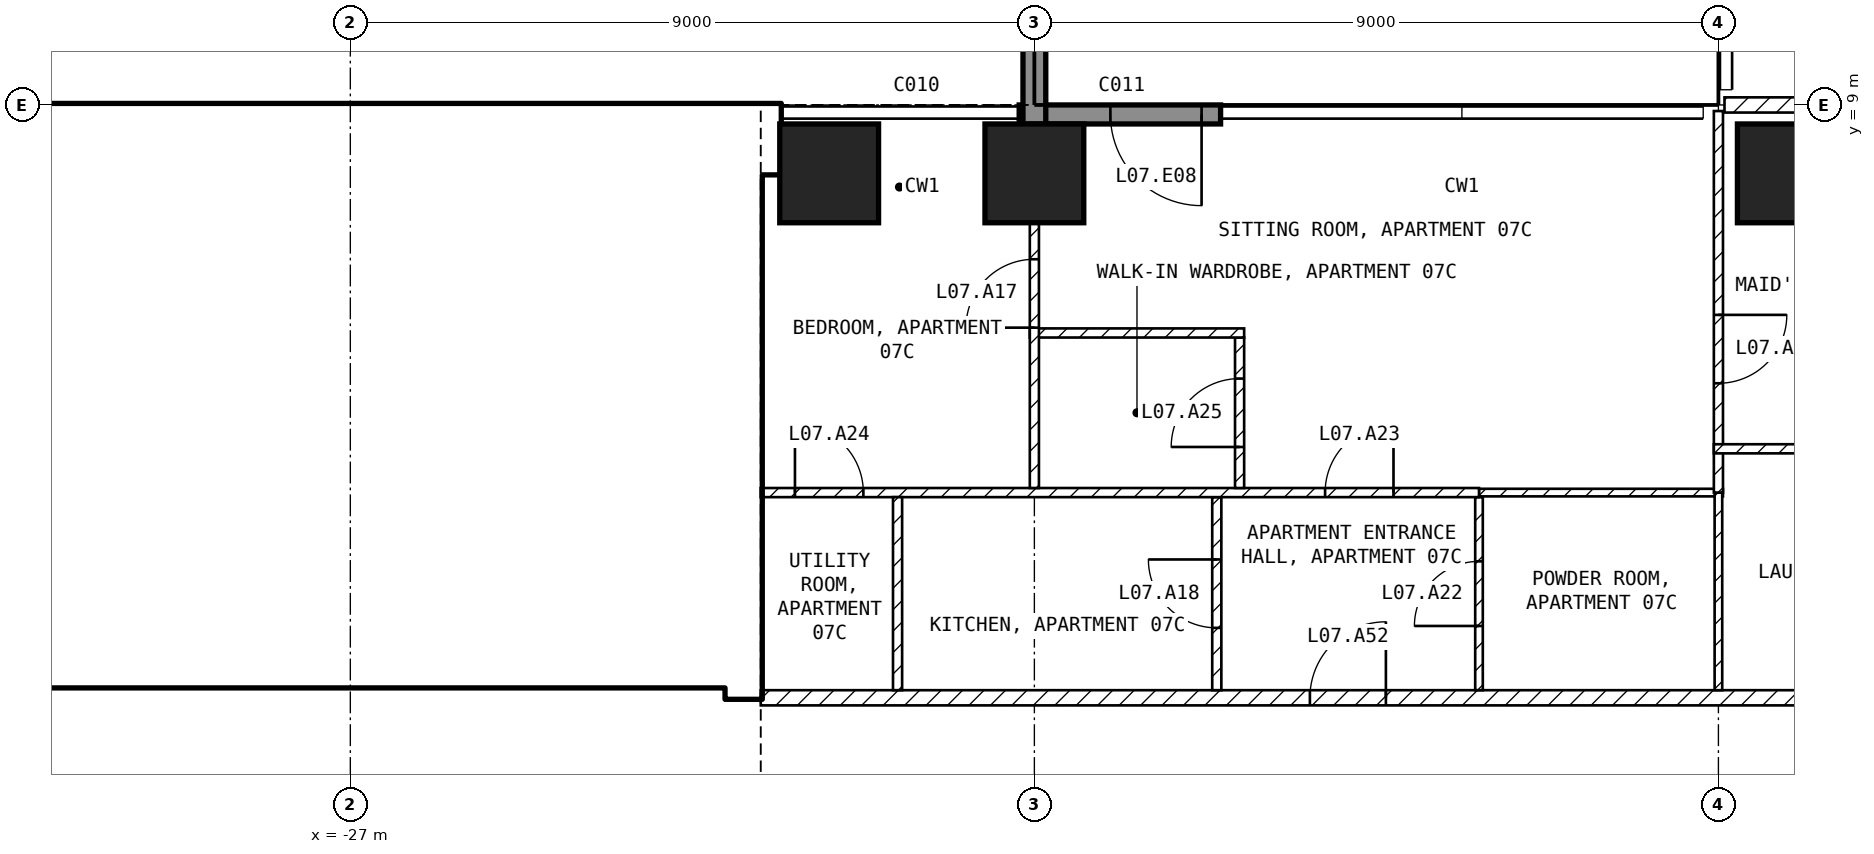
"""IFC4 building model, lengths in metres.
Left out: names, types, materials, properties, quantities, classifications, styles, units other than length and angle.
Written with IfcOpenShell. Run it as: python <this file> out.ifc"""

import sys

from ifc_helpers import new_model, si_unit, direction, frame, frame_2d, origin, origin_2d, place, context, subcontext, project, spatial, rectangle, extrude, element, fill, save


model = new_model("IFC4")
c1 = context("Model", 3, precision=1e-05, world=origin(), true_north=direction((0.0, 1.0)))
c2 = subcontext(c1, "Body", "Model", "MODEL_VIEW")
j1 = project(units=[si_unit("LENGTHUNIT", "METRE"), si_unit("PLANEANGLEUNIT", "RADIAN")], contexts=[c1])
p1 = place(None, origin())
s1 = spatial("IfcSite", under=j1, at=p1, CompositionType="ELEMENT")
p2 = place(p1, origin())
s2 = spatial("IfcBuilding", under=s1, at=p2, CompositionType="ELEMENT")
p3 = place(p2, frame((0.0, 0.0, 43.5)))
s3 = spatial("IfcBuildingStorey", under=s2, at=p3, CompositionType="ELEMENT", Elevation=43.5)
for number, where, z_axis, x_axis in (
    (1, (-20.7, 8.1, -0.25), (0.0, 0.0, 1.0), (1.0, 0.0, 0.0)),
    (2, (-18.0, 8.1, -0.25), (0.0, 0.0, 1.0), (1.0, 0.0, 0.0)),
    (3, (-8.1, 8.1, -0.25), (0.0, 0.0, 1.0), (1.0, 0.0, 0.0)),
):
    element("IfcColumn", number, at=place(p3, frame(where, z_axis=z_axis, x_axis=x_axis)), inside=s3, PredefinedType="COLUMN", context=c2, shape_type="SweptSolid", body=[
        extrude(rectangle(XDim=1.3, YDim=1.3, at=origin_2d()), origin(), (0.0, 0.0, 1.0), 3.5),
    ])
p4 = place(p3, frame((-15.55, 8.875, 0.0), z_axis=(0.0, 0.0, 1.0), x_axis=(-1.0, 0.0, 0.0)))
e4 = element("IfcWall", 4, at=p4, inside=s3, PredefinedType="SOLIDWALL", context=c2, shape_type="SweptSolid", body=[
    extrude(rectangle(XDim=2.65, YDim=0.25, at=frame_2d((1.325, 0.0))), origin(), (0.0, 0.0, 1.0), 3.25),
])
p5 = place(p4, frame((0.25, 0.0, 0.0)))
e5 = element("IfcOpeningElement", 5, at=p5, cuts=e4, PredefinedType="OPENING", context=c2, shape_type="SweptSolid", body=[
    extrude(rectangle(XDim=1.2, YDim=2.4, at=frame_2d((0.6, 1.2))), frame((0.0, 0.135, 0.0), z_axis=(0.0, -1.0, 0.0), x_axis=(1.0, 0.0, 0.0)), (0.0, 0.0, 1.0), 0.27),
])
p6 = place(p3, frame((-18.0, 8.75, 0.0), z_axis=(0.0, 0.0, 1.0), x_axis=(0.0, 1.0, 0.0)))
e6 = element("IfcWall", 6, at=p6, inside=s3, PredefinedType="SOLIDWALL", context=c2, shape_type="SweptSolid", body=[
    extrude(rectangle(XDim=2.95, YDim=0.3, at=frame_2d((1.475, 0.0))), origin(), (0.0, 0.0, 1.0), 3.25),
])
p7 = place(p3, frame((-31.5, 8.55, 0.0), z_axis=(0.0, 0.0, 1.0), x_axis=(1.0, 0.0, 0.0)))
e7 = element("IfcWall", 7, at=p7, inside=s3, PredefinedType="SHEAR", context=c2, shape_type="SweptSolid", body=[
    extrude(rectangle(XDim=10.15, YDim=0.9, at=frame_2d((5.075, 0.0))), origin(), (0.0, 0.0, 1.0), 3.25),
])
p8 = place(p3, frame((-21.825, 1.2, 0.0), z_axis=(0.0, 0.0, 1.0), x_axis=(0.0, 1.0, 0.0)))
e8 = element("IfcWall", 8, at=p8, inside=s3, PredefinedType="SHEAR", context=c2, shape_type="SweptSolid", body=[
    extrude(rectangle(XDim=6.9, YDim=0.45, at=frame_2d((3.45, 0.0))), origin(), (0.0, 0.0, 1.0), 3.25),
])
p9 = place(p3, frame((-35.1, 1.45, 0.0), z_axis=(0.0, 0.0, 1.0), x_axis=(1.0, 0.0, 0.0)))
e9 = element("IfcWall", 9, at=p9, inside=s3, PredefinedType="SOLIDWALL", context=c2, shape_type="SweptSolid", body=[
    extrude(rectangle(XDim=13.05, YDim=0.2, at=frame_2d((6.525, 0.0))), origin(), (0.0, 0.0, 1.0), 3.25),
])
p10 = place(p9, frame((11.3, 0.0, 0.0)))
e10 = element("IfcOpeningElement", 10, at=p10, cuts=e9, PredefinedType="OPENING", context=c2, shape_type="SweptSolid", body=[
    extrude(rectangle(XDim=1.0, YDim=2.1, at=frame_2d((0.5, 1.05))), frame((0.0, 0.11, 0.0), z_axis=(0.0, -1.0, 0.0), x_axis=(1.0, 0.0, 0.0)), (0.0, 0.0, 1.0), 0.22),
])
p11 = place(p9, frame((8.8, 0.0, 0.0)))
e11 = element("IfcOpeningElement", 11, at=p11, cuts=e9, PredefinedType="OPENING", context=c2, shape_type="SweptSolid", body=[
    extrude(rectangle(XDim=1.0, YDim=2.1, at=frame_2d((0.5, 1.05))), frame((0.0, 0.11, 0.0), z_axis=(0.0, -1.0, 0.0), x_axis=(1.0, 0.0, 0.0)), (0.0, 0.0, 1.0), 0.22),
])
p12 = place(p3, frame((-28.35, 5.15, 0.0), z_axis=(0.0, 0.0, 1.0), x_axis=(1.0, 0.0, 0.0)))
e12 = element("IfcWall", 12, at=p12, inside=s3, PredefinedType="SOLIDWALL", context=c2, shape_type="SweptSolid", body=[
    extrude(rectangle(XDim=6.3, YDim=0.2, at=frame_2d((3.15, 0.0))), origin(), (0.0, 0.0, 1.0), 3.25),
])
p13 = place(p12, frame((5.1, 0.0, 0.0)))
e13 = element("IfcOpeningElement", 13, at=p13, cuts=e12, PredefinedType="OPENING", context=c2, shape_type="SweptSolid", body=[
    extrude(rectangle(XDim=1.0, YDim=2.1, at=frame_2d((0.5, 1.05))), frame((0.0, 0.11, 0.0), z_axis=(0.0, -1.0, 0.0), x_axis=(1.0, 0.0, 0.0)), (0.0, 0.0, 1.0), 0.22),
])
p14 = place(p3, frame((-28.25, 5.25, 0.0), z_axis=(0.0, 0.0, 1.0), x_axis=(0.0, 1.0, 0.0)))
e14 = element("IfcWall", 14, at=p14, inside=s3, PredefinedType="SOLIDWALL", context=c2, shape_type="SweptSolid", body=[
    extrude(rectangle(XDim=2.85, YDim=0.2, at=frame_2d((1.425, 0.0))), origin(), (0.0, 0.0, 1.0), 3.25),
])
p15 = place(p3, frame((-35.1, 3.95, 0.0), z_axis=(0.0, 0.0, 1.0), x_axis=(1.0, 0.0, 0.0)))
e15 = element("IfcWall", 15, at=p15, inside=s3, PredefinedType="SOLIDWALL", context=c2, shape_type="SweptSolid", body=[
    extrude(rectangle(XDim=7.9, YDim=0.2, at=frame_2d((3.95, 0.0))), origin(), (0.0, 0.0, 1.0), 3.25),
])
p16 = place(p3, frame((-27.1, 1.55, 0.0), z_axis=(0.0, 0.0, 1.0), x_axis=(0.0, 1.0, 0.0)))
e16 = element("IfcWall", 16, at=p16, inside=s3, PredefinedType="SOLIDWALL", context=c2, shape_type="SweptSolid", body=[
    extrude(rectangle(XDim=3.5, YDim=0.2, at=frame_2d((1.75, 0.0))), origin(), (0.0, 0.0, 1.0), 3.25),
])
p17 = place(p16, frame((0.6, 0.0, 0.0)))
e17 = element("IfcOpeningElement", 17, at=p17, cuts=e16, PredefinedType="OPENING", context=c2, shape_type="SweptSolid", body=[
    extrude(rectangle(XDim=1.1, YDim=2.1, at=frame_2d((0.55, 1.05))), frame((0.0, 0.11, 0.0), z_axis=(0.0, -1.0, 0.0), x_axis=(1.0, 0.0, 0.0)), (0.0, 0.0, 1.0), 0.22),
])
p18 = place(p16, frame((2.6, 0.0, 0.0)))
e18 = element("IfcOpeningElement", 18, at=p18, cuts=e16, PredefinedType="OPENING", context=c2, shape_type="SweptSolid", body=[
    extrude(rectangle(XDim=0.8, YDim=2.1, at=frame_2d((0.4, 1.05))), frame((0.0, 0.11, 0.0), z_axis=(0.0, -1.0, 0.0), x_axis=(1.0, 0.0, 0.0)), (0.0, 0.0, 1.0), 0.22),
])
p19 = place(p3, frame((-30.0, 1.55, 0.0), z_axis=(0.0, 0.0, 1.0), x_axis=(0.0, 1.0, 0.0)))
e19 = element("IfcWall", 19, at=p19, inside=s3, PredefinedType="SOLIDWALL", context=c2, shape_type="SweptSolid", body=[
    extrude(rectangle(XDim=2.3, YDim=0.2, at=frame_2d((1.15, 0.0))), origin(), (0.0, 0.0, 1.0), 3.25),
])
p20 = place(p3, frame((-30.0, 4.05, 0.0), z_axis=(0.0, 0.0, 1.0), x_axis=(0.0, 1.0, 0.0)))
e20 = element("IfcWall", 20, at=p20, inside=s3, PredefinedType="PARTITIONING", context=c2, shape_type="SweptSolid", body=[
    extrude(rectangle(XDim=4.05, YDim=0.15, at=frame_2d((2.025, 0.0))), origin(), (0.0, 0.0, 1.0), 3.25),
])
p21 = place(p20, frame((0.1, 0.0, 0.0)))
e21 = element("IfcOpeningElement", 21, at=p21, cuts=e20, PredefinedType="OPENING", context=c2, shape_type="SweptSolid", body=[
    extrude(rectangle(XDim=0.8, YDim=2.1, at=frame_2d((0.4, 1.05))), frame((0.0, 0.085, 0.0), z_axis=(0.0, -1.0, 0.0), x_axis=(1.0, 0.0, 0.0)), (0.0, 0.0, 1.0), 0.17),
])
p22 = place(p3, frame((-21.6, 1.2, 0.0), z_axis=(0.0, 0.0, 1.0), x_axis=(1.0, 0.0, 0.0)))
e22 = element("IfcWall", 22, at=p22, inside=s3, PredefinedType="PARTITIONING", context=c2, shape_type="SweptSolid", body=[
    extrude(rectangle(XDim=20.5, YDim=0.2, at=frame_2d((10.25, 0.0))), origin(), (0.0, 0.0, 1.0), 3.25),
])
p23 = place(p22, frame((7.225, 0.0, 0.0)))
e23 = element("IfcOpeningElement", 23, at=p23, cuts=e22, PredefinedType="OPENING", context=c2, shape_type="SweptSolid", body=[
    extrude(rectangle(XDim=1.0, YDim=2.1, at=frame_2d((0.5, 1.05))), frame((0.0, 0.11, 0.0), z_axis=(0.0, -1.0, 0.0), x_axis=(1.0, 0.0, 0.0)), (0.0, 0.0, 1.0), 0.22),
])
p24 = place(p3, frame((-8.92, 9.0, 0.0), z_axis=(0.0, 0.0, 1.0), x_axis=(1.0, 0.0, 0.0)))
e24 = element("IfcWall", 24, at=p24, inside=s3, PredefinedType="PARTITIONING", context=c2, shape_type="SweptSolid", body=[
    extrude(rectangle(XDim=17.84, YDim=0.2, at=frame_2d((8.92, 0.0))), origin(), (0.0, 0.0, 1.0), 3.25),
])
p25 = place(p24, frame((8.42, 0.0, 0.0)))
e25 = element("IfcOpeningElement", 25, at=p25, cuts=e24, PredefinedType="OPENING", context=c2, shape_type="SweptSolid", body=[
    extrude(rectangle(XDim=1.0, YDim=2.1, at=frame_2d((0.5, 1.05))), frame((0.0, 0.11, 0.0), z_axis=(0.0, -1.0, 0.0), x_axis=(1.0, 0.0, 0.0)), (0.0, 0.0, 1.0), 0.22),
])
p26 = place(p3, frame((-12.15, 1.3, 0.0), z_axis=(0.0, 0.0, 1.0), x_axis=(0.0, 1.0, 0.0)))
e26 = element("IfcWall", 26, at=p26, inside=s3, PredefinedType="PARTITIONING", context=c2, shape_type="SweptSolid", body=[
    extrude(rectangle(XDim=2.54, YDim=0.1, at=frame_2d((1.27, 0.0))), origin(), (0.0, 0.0, 1.0), 3.25),
])
p27 = place(p26, frame((0.845, 0.0, 0.0)))
e27 = element("IfcOpeningElement", 27, at=p27, cuts=e26, PredefinedType="OPENING", context=c2, shape_type="SweptSolid", body=[
    extrude(rectangle(XDim=0.85, YDim=2.1, at=frame_2d((0.425, 1.05))), frame((0.0, 0.06, 0.0), z_axis=(0.0, -1.0, 0.0), x_axis=(1.0, 0.0, 0.0)), (0.0, 0.0, 1.0), 0.12),
])
p28 = place(p3, frame((-12.15, 3.9, 0.0), z_axis=(0.0, 0.0, 1.0), x_axis=(1.0, 0.0, 0.0)))
e28 = element("IfcWall", 28, at=p28, inside=s3, PredefinedType="PARTITIONING", context=c2, shape_type="SweptSolid", body=[
    extrude(rectangle(XDim=3.21, YDim=0.1, at=frame_2d((1.605, 0.0))), origin(), (0.0, 0.0, 1.0), 3.25),
])
p29 = place(p3, frame((-9.0, 3.9, 0.0), z_axis=(0.0, 0.0, 1.0), x_axis=(0.0, -1.0, 0.0)))
e29 = element("IfcWall", 29, at=p29, inside=s3, PredefinedType="PARTITIONING", context=c2, shape_type="SweptSolid", body=[
    extrude(rectangle(XDim=2.6, YDim=0.1, at=frame_2d((1.3, 0.0))), origin(), (0.0, 0.0, 1.0), 3.25),
])
p30 = place(p3, frame((-15.6, 1.3, 0.0), z_axis=(0.0, 0.0, 1.0), x_axis=(0.0, 1.0, 0.0)))
e30 = element("IfcWall", 30, at=p30, inside=s3, PredefinedType="PARTITIONING", context=c2, shape_type="SweptSolid", body=[
    extrude(rectangle(XDim=2.54, YDim=0.12, at=frame_2d((1.27, 0.0))), origin(), (0.0, 0.0, 1.0), 3.25),
])
p31 = place(p30, frame((0.82, 0.0, 0.0)))
e31 = element("IfcOpeningElement", 31, at=p31, cuts=e30, PredefinedType="OPENING", context=c2, shape_type="SweptSolid", body=[
    extrude(rectangle(XDim=0.9, YDim=2.1, at=frame_2d((0.45, 1.05))), frame((0.0, 0.07, 0.0), z_axis=(0.0, -1.0, 0.0), x_axis=(1.0, 0.0, 0.0)), (0.0, 0.0, 1.0), 0.14),
])
p32 = place(p3, frame((-21.6, 3.9, 0.0), z_axis=(0.0, 0.0, 1.0), x_axis=(1.0, 0.0, 0.0)))
e32 = element("IfcWall", 32, at=p32, inside=s3, PredefinedType="PARTITIONING", context=c2, shape_type="SweptSolid", body=[
    extrude(rectangle(XDim=9.45, YDim=0.12, at=frame_2d((4.725, 0.0))), origin(), (0.0, 0.0, 1.0), 3.25),
])
p33 = place(p32, frame((7.425, 0.0, 0.0)))
e33 = element("IfcOpeningElement", 33, at=p33, cuts=e32, PredefinedType="OPENING", context=c2, shape_type="SweptSolid", body=[
    extrude(rectangle(XDim=0.9, YDim=2.1, at=frame_2d((0.45, 1.05))), frame((0.0, 0.07, 0.0), z_axis=(0.0, -1.0, 0.0), x_axis=(1.0, 0.0, 0.0)), (0.0, 0.0, 1.0), 0.14),
])
p34 = place(p32, frame((0.45, 0.0, 0.0)))
e34 = element("IfcOpeningElement", 34, at=p34, cuts=e32, PredefinedType="OPENING", context=c2, shape_type="SweptSolid", body=[
    extrude(rectangle(XDim=0.9, YDim=2.1, at=frame_2d((0.45, 1.05))), frame((0.0, 0.07, 0.0), z_axis=(0.0, -1.0, 0.0), x_axis=(1.0, 0.0, 0.0)), (0.0, 0.0, 1.0), 0.14),
])
p35 = place(p3, frame((-19.8, 1.3, 0.0), z_axis=(0.0, 0.0, 1.0), x_axis=(0.0, 1.0, 0.0)))
e35 = element("IfcWall", 35, at=p35, inside=s3, PredefinedType="PARTITIONING", context=c2, shape_type="SweptSolid", body=[
    extrude(rectangle(XDim=2.54, YDim=0.12, at=frame_2d((1.27, 0.0))), origin(), (0.0, 0.0, 1.0), 3.25),
])
p36 = place(p3, frame((-15.3, 3.96, 0.0), z_axis=(0.0, 0.0, 1.0), x_axis=(0.0, 1.0, 0.0)))
e36 = element("IfcWall", 36, at=p36, inside=s3, PredefinedType="PARTITIONING", context=c2, shape_type="SweptSolid", body=[
    extrude(rectangle(XDim=1.98, YDim=0.12, at=frame_2d((0.99, 0.0))), origin(), (0.0, 0.0, 1.0), 3.25),
])
p37 = place(p36, frame((0.54, 0.0, 0.0)))
e37 = element("IfcOpeningElement", 37, at=p37, cuts=e36, PredefinedType="OPENING", context=c2, shape_type="SweptSolid", body=[
    extrude(rectangle(XDim=0.9, YDim=2.1, at=frame_2d((0.45, 1.05))), frame((0.0, 0.07, 0.0), z_axis=(0.0, -1.0, 0.0), x_axis=(1.0, 0.0, 0.0)), (0.0, 0.0, 1.0), 0.14),
])
p38 = place(p3, frame((-15.24, 6.0, 0.0), z_axis=(0.0, 0.0, 1.0), x_axis=(-1.0, 0.0, 0.0)))
e38 = element("IfcWall", 38, at=p38, inside=s3, PredefinedType="PARTITIONING", context=c2, shape_type="SweptSolid", body=[
    extrude(rectangle(XDim=2.82, YDim=0.12, at=frame_2d((1.41, 0.0))), origin(), (0.0, 0.0, 1.0), 3.25),
])
p39 = place(p3, frame((-18.0, 3.96, 0.0), z_axis=(0.0, 0.0, 1.0), x_axis=(0.0, 1.0, 0.0)))
e39 = element("IfcWall", 39, at=p39, inside=s3, PredefinedType="PARTITIONING", context=c2, shape_type="SweptSolid", body=[
    extrude(rectangle(XDim=3.49, YDim=0.12, at=frame_2d((1.745, 0.0))), origin(), (0.0, 0.0, 1.0), 2.346),
])
p40 = place(p39, frame((2.11, 0.0, 0.0)))
e40 = element("IfcOpeningElement", 40, at=p40, cuts=e39, PredefinedType="OPENING", context=c2, shape_type="SweptSolid", body=[
    extrude(rectangle(XDim=0.9, YDim=2.1, at=frame_2d((0.45, 1.05))), frame((0.0, 0.07, 0.0), z_axis=(0.0, -1.0, 0.0), x_axis=(1.0, 0.0, 0.0)), (0.0, 0.0, 1.0), 0.14),
])
p41 = place(p3, frame((-9.0, 8.92, 0.0), z_axis=(0.0, 0.0, 1.0), x_axis=(0.0, -1.0, 0.0)))
e41 = element("IfcWall", 41, at=p41, inside=s3, PredefinedType="PARTITIONING", context=c2, shape_type="SweptSolid", body=[
    extrude(rectangle(XDim=5.02, YDim=0.12, at=frame_2d((2.51, 0.0))), origin(), (0.0, 0.0, 1.0), 3.25),
])
p42 = place(p41, frame((2.682, 0.0, 0.0)))
e42 = element("IfcOpeningElement", 42, at=p42, cuts=e41, PredefinedType="OPENING", context=c2, shape_type="SweptSolid", body=[
    extrude(rectangle(XDim=0.9, YDim=2.1, at=frame_2d((0.45, 1.05))), frame((0.0, 0.07, 0.0), z_axis=(0.0, -1.0, 0.0), x_axis=(1.0, 0.0, 0.0)), (0.0, 0.0, 1.0), 0.14),
])
p43 = place(p3, frame((-9.06, 4.476, 0.0), z_axis=(0.0, 0.0, 1.0), x_axis=(1.0, 0.0, 0.0)))
e43 = element("IfcWall", 43, at=p43, inside=s3, PredefinedType="PARTITIONING", context=c2, shape_type="SweptSolid", body=[
    extrude(rectangle(XDim=4.62, YDim=0.12, at=frame_2d((2.31, 0.0))), origin(), (0.0, 0.0, 1.0), 3.25),
])
p44 = place(p43, frame((1.86, 0.0, 0.0)))
e44 = element("IfcOpeningElement", 44, at=p44, cuts=e43, PredefinedType="OPENING", context=c2, shape_type="SweptSolid", body=[
    extrude(rectangle(XDim=0.9, YDim=2.1, at=frame_2d((0.45, 1.05))), frame((0.0, 0.07, 0.0), z_axis=(0.0, -1.0, 0.0), x_axis=(1.0, 0.0, 0.0)), (0.0, 0.0, 1.0), 0.14),
])
p45 = place(p5, origin())
e45 = element("IfcDoor", 45, at=p45, inside=s3, OperationType="SINGLE_SWING_LEFT", PredefinedType="DOOR", context=c2, shape_type="SweptSolid", body=[
    extrude(rectangle(XDim=1.2, YDim=2.4, at=frame_2d((0.6, 1.2))), frame((0.0, 0.025, 0.0), z_axis=(0.0, -1.0, 0.0), x_axis=(1.0, 0.0, 0.0)), (0.0, 0.0, 1.0), 0.05),
])
fill(e5, e45)
p46 = place(p17, origin())
e46 = element("IfcDoor", 46, at=p46, inside=s3, OperationType="DOUBLE_DOOR_SLIDING", PredefinedType="DOOR", context=c2, shape_type="SweptSolid", body=[
    extrude(rectangle(XDim=1.1, YDim=2.1, at=frame_2d((0.55, 1.05))), frame((0.0, 0.025, 0.0), z_axis=(0.0, -1.0, 0.0), x_axis=(1.0, 0.0, 0.0)), (0.0, 0.0, 1.0), 0.05),
])
fill(e17, e46)
p47 = place(p13, origin())
e47 = element("IfcDoor", 47, at=p47, inside=s3, OperationType="SINGLE_SWING_LEFT", PredefinedType="DOOR", context=c2, shape_type="SweptSolid", body=[
    extrude(rectangle(XDim=1.0, YDim=2.1, at=frame_2d((0.5, 1.05))), frame((0.0, 0.025, 0.0), z_axis=(0.0, -1.0, 0.0), x_axis=(1.0, 0.0, 0.0)), (0.0, 0.0, 1.0), 0.05),
])
fill(e13, e47)
p48 = place(p10, origin())
e48 = element("IfcDoor", 48, at=p48, inside=s3, OperationType="SINGLE_SWING_LEFT", PredefinedType="DOOR", context=c2, shape_type="SweptSolid", body=[
    extrude(rectangle(XDim=1.0, YDim=2.1, at=frame_2d((0.5, 1.05))), frame((0.0, 0.025, 0.0), z_axis=(0.0, -1.0, 0.0), x_axis=(1.0, 0.0, 0.0)), (0.0, 0.0, 1.0), 0.05),
])
fill(e10, e48)
p49 = place(p11, origin())
e49 = element("IfcDoor", 49, at=p49, inside=s3, OperationType="SINGLE_SWING_LEFT", PredefinedType="DOOR", context=c2, shape_type="SweptSolid", body=[
    extrude(rectangle(XDim=1.0, YDim=2.1, at=frame_2d((0.5, 1.05))), frame((0.0, 0.025, 0.0), z_axis=(0.0, -1.0, 0.0), x_axis=(1.0, 0.0, 0.0)), (0.0, 0.0, 1.0), 0.05),
])
fill(e11, e49)
p50 = place(p18, origin())
e50 = element("IfcDoor", 50, at=p50, inside=s3, OperationType="SINGLE_SWING_LEFT", PredefinedType="DOOR", context=c2, shape_type="SweptSolid", body=[
    extrude(rectangle(XDim=0.8, YDim=2.1, at=frame_2d((0.4, 1.05))), frame((0.0, 0.025, 0.0), z_axis=(0.0, -1.0, 0.0), x_axis=(1.0, 0.0, 0.0)), (0.0, 0.0, 1.0), 0.05),
])
fill(e18, e50)
p51 = place(p21, origin())
e51 = element("IfcDoor", 51, at=p51, inside=s3, OperationType="SINGLE_SWING_LEFT", PredefinedType="DOOR", context=c2, shape_type="SweptSolid", body=[
    extrude(rectangle(XDim=0.8, YDim=2.1, at=frame_2d((0.4, 1.05))), frame((0.0, 0.025, 0.0), z_axis=(0.0, -1.0, 0.0), x_axis=(1.0, 0.0, 0.0)), (0.0, 0.0, 1.0), 0.05),
])
fill(e21, e51)
p52 = place(p40, origin())
e52 = element("IfcDoor", 52, at=p52, inside=s3, OperationType="SINGLE_SWING_LEFT", PredefinedType="DOOR", context=c2, shape_type="SweptSolid", body=[
    extrude(rectangle(XDim=0.9, YDim=2.1, at=frame_2d((0.45, 1.05))), frame((0.0, 0.025, 0.0), z_axis=(0.0, -1.0, 0.0), x_axis=(1.0, 0.0, 0.0)), (0.0, 0.0, 1.0), 0.05),
])
fill(e40, e52)
p53 = place(p31, origin())
e53 = element("IfcDoor", 53, at=p53, inside=s3, OperationType="SINGLE_SWING_RIGHT", PredefinedType="DOOR", context=c2, shape_type="SweptSolid", body=[
    extrude(rectangle(XDim=0.9, YDim=2.1, at=frame_2d((0.45, 1.05))), frame((0.0, 0.025, 0.0), z_axis=(0.0, -1.0, 0.0), x_axis=(1.0, 0.0, 0.0)), (0.0, 0.0, 1.0), 0.05),
])
fill(e31, e53)
p54 = place(p42, origin())
e54 = element("IfcDoor", 54, at=p54, inside=s3, OperationType="SINGLE_SWING_LEFT", PredefinedType="DOOR", context=c2, shape_type="SweptSolid", body=[
    extrude(rectangle(XDim=0.9, YDim=2.1, at=frame_2d((0.45, 1.05))), frame((0.0, 0.025, 0.0), z_axis=(0.0, -1.0, 0.0), x_axis=(1.0, 0.0, 0.0)), (0.0, 0.0, 1.0), 0.05),
])
fill(e42, e54)
p55 = place(p27, origin())
e55 = element("IfcDoor", 55, at=p55, inside=s3, OperationType="SINGLE_SWING_LEFT", PredefinedType="DOOR", context=c2, shape_type="SweptSolid", body=[
    extrude(rectangle(XDim=0.85, YDim=2.1, at=frame_2d((0.425, 1.05))), frame((0.0, 0.025, 0.0), z_axis=(0.0, -1.0, 0.0), x_axis=(1.0, 0.0, 0.0)), (0.0, 0.0, 1.0), 0.05),
])
fill(e27, e55)
p56 = place(p33, origin())
e56 = element("IfcDoor", 56, at=p56, inside=s3, OperationType="SINGLE_SWING_RIGHT", PredefinedType="DOOR", context=c2, shape_type="SweptSolid", body=[
    extrude(rectangle(XDim=0.9, YDim=2.1, at=frame_2d((0.45, 1.05))), frame((0.0, 0.025, 0.0), z_axis=(0.0, -1.0, 0.0), x_axis=(1.0, 0.0, 0.0)), (0.0, 0.0, 1.0), 0.05),
])
fill(e33, e56)
p57 = place(p34, origin())
e57 = element("IfcDoor", 57, at=p57, inside=s3, OperationType="SINGLE_SWING_LEFT", PredefinedType="DOOR", context=c2, shape_type="SweptSolid", body=[
    extrude(rectangle(XDim=0.9, YDim=2.1, at=frame_2d((0.45, 1.05))), frame((0.0, 0.025, 0.0), z_axis=(0.0, -1.0, 0.0), x_axis=(1.0, 0.0, 0.0)), (0.0, 0.0, 1.0), 0.05),
])
fill(e34, e57)
p58 = place(p37, origin())
e58 = element("IfcDoor", 58, at=p58, inside=s3, OperationType="SINGLE_SWING_LEFT", PredefinedType="DOOR", context=c2, shape_type="SweptSolid", body=[
    extrude(rectangle(XDim=0.9, YDim=2.1, at=frame_2d((0.45, 1.05))), frame((0.0, 0.025, 0.0), z_axis=(0.0, -1.0, 0.0), x_axis=(1.0, 0.0, 0.0)), (0.0, 0.0, 1.0), 0.05),
])
fill(e37, e58)
p59 = place(p23, origin())
e59 = element("IfcDoor", 59, at=p59, inside=s3, OperationType="SINGLE_SWING_RIGHT", PredefinedType="DOOR", context=c2, shape_type="SweptSolid", body=[
    extrude(rectangle(XDim=1.0, YDim=2.1, at=frame_2d((0.5, 1.05))), frame((0.0, 0.025, 0.0), z_axis=(0.0, -1.0, 0.0), x_axis=(1.0, 0.0, 0.0)), (0.0, 0.0, 1.0), 0.05),
])
fill(e23, e59)
save(model, sys.argv[1])
